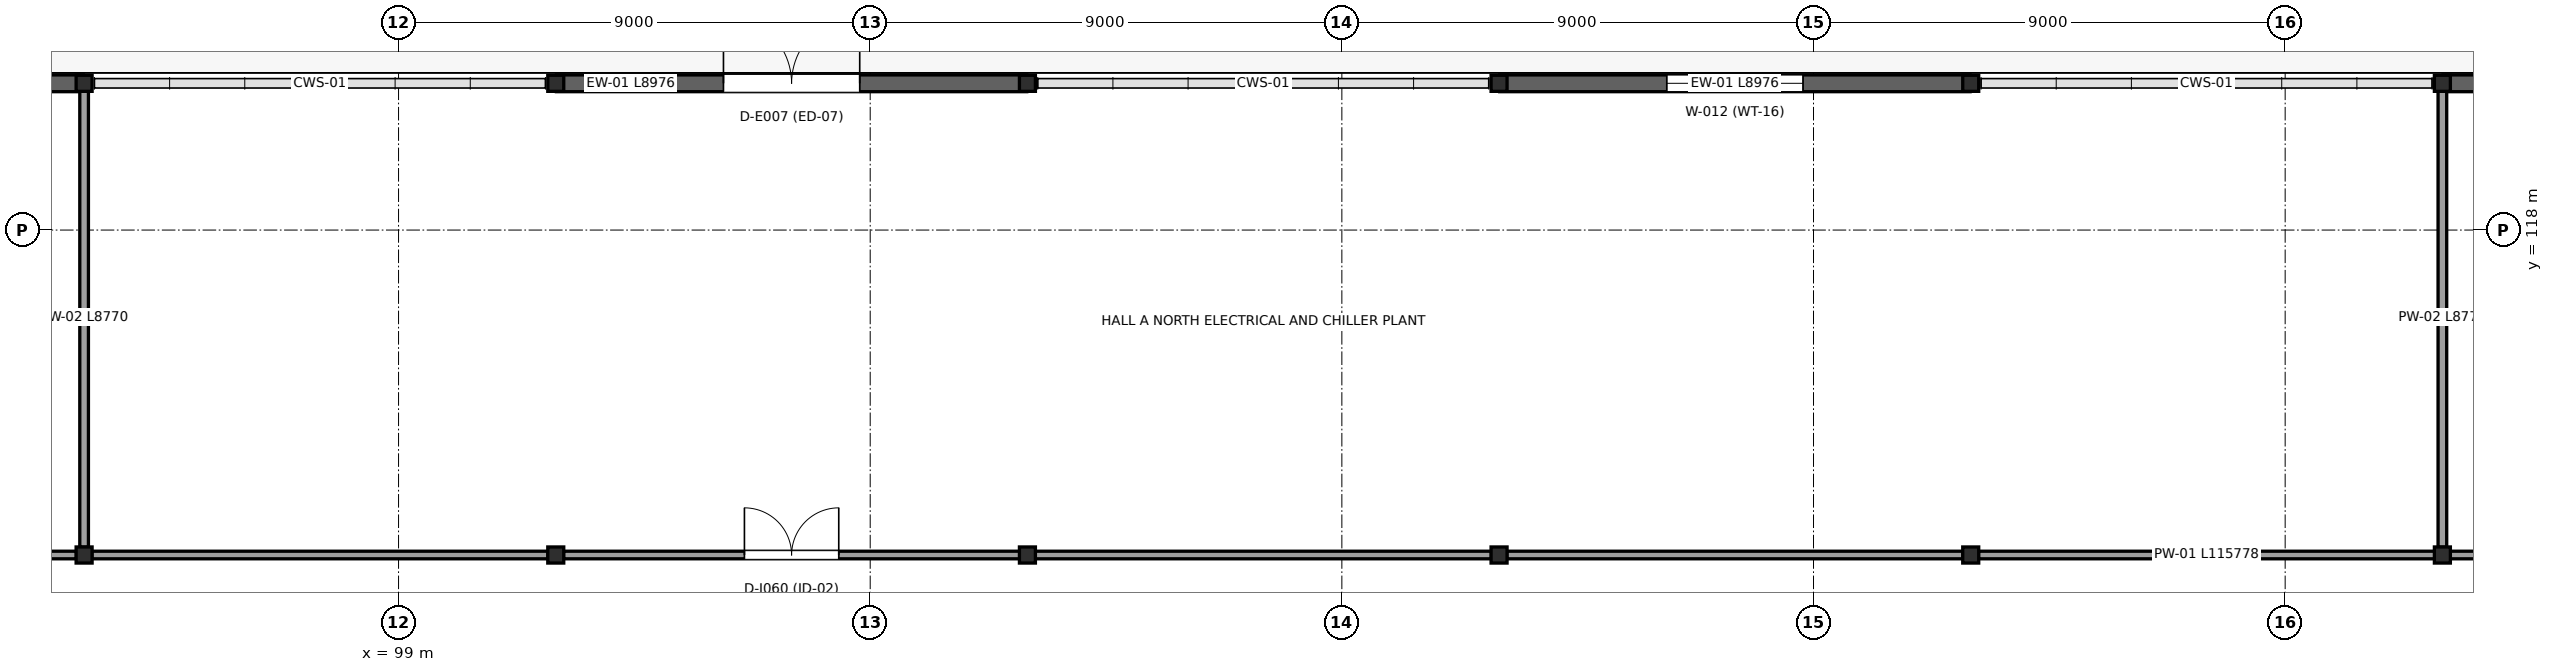
"""IFC4 building model, lengths in metres.
Left out: names, types, materials, properties, quantities, classifications, styles, units other than length and angle.
Written with IfcOpenShell. Run it as: python <this file> out.ifc"""

import sys

from ifc_helpers import new_model, si_unit, direction, frame, frame_2d, origin, origin_2d, place, context, subcontext, project, spatial, rectangle, i_section, extrude, element, fill, save


model = new_model("IFC4")
c1 = context("Model", 3, precision=1e-05, world=origin(), true_north=direction((0.0, 1.0)))
c2 = subcontext(c1, "Body", "Model", "MODEL_VIEW")
j1 = project(units=[si_unit("LENGTHUNIT", "METRE"), si_unit("PLANEANGLEUNIT", "RADIAN")], contexts=[c1])
p1 = place(None, origin())
s1 = spatial("IfcSite", under=j1, at=p1, CompositionType="ELEMENT")
p2 = place(p1, origin())
s2 = spatial("IfcBuilding", under=s1, at=p2, CompositionType="ELEMENT")
p3 = place(p2, origin())
s3 = spatial("IfcBuildingStorey", under=s2, at=p3, CompositionType="ELEMENT", Elevation=0.0)
for number, where, z_axis, x_axis in (
    (1, (93.0, 111.8, 0.0), (0.0, 0.0, 1.0), (1.0, 0.0, 0.0)),
    (2, (93.0, 120.8, 0.0), (0.0, 0.0, 1.0), (1.0, 0.0, 0.0)),
    (3, (102.0, 111.8, 0.0), (0.0, 0.0, 1.0), (1.0, 0.0, 0.0)),
    (4, (102.0, 120.8, 0.0), (0.0, 0.0, 1.0), (1.0, 0.0, 0.0)),
    (5, (111.0, 111.8, 0.0), (0.0, 0.0, 1.0), (1.0, 0.0, 0.0)),
    (6, (111.0, 120.8, 0.0), (0.0, 0.0, 1.0), (1.0, 0.0, 0.0)),
    (7, (120.0, 111.8, 0.0), (0.0, 0.0, 1.0), (1.0, 0.0, 0.0)),
    (8, (120.0, 120.8, 0.0), (0.0, 0.0, 1.0), (1.0, 0.0, 0.0)),
    (9, (129.0, 111.8, 0.0), (0.0, 0.0, 1.0), (1.0, 0.0, 0.0)),
    (10, (129.0, 120.8, 0.0), (0.0, 0.0, 1.0), (1.0, 0.0, 0.0)),
    (11, (138.0, 111.8, 0.0), (0.0, 0.0, 1.0), (1.0, 0.0, 0.0)),
    (12, (138.0, 120.8, 0.0), (0.0, 0.0, 1.0), (1.0, 0.0, 0.0)),
):
    element("IfcColumn", number, at=place(p3, frame(where, z_axis=z_axis, x_axis=x_axis)), inside=s3, PredefinedType="COLUMN", context=c2, shape_type="SweptSolid", body=[
        extrude(i_section(OverallWidth=0.305, OverallDepth=0.307, WebThickness=0.01, FlangeThickness=0.015, at=origin_2d()), origin(), (0.0, 0.0, 1.0), 6.0),
    ])
p4 = place(p3, frame((84.012, 120.8, 0.0), z_axis=(0.0, 0.0, 1.0), x_axis=(1.0, 0.0, 0.0)))
e13 = element("IfcWall", 13, at=p4, inside=s3, PredefinedType="STANDARD", context=c2, shape_type="SweptSolid", body=[
    extrude(rectangle(XDim=8.976, YDim=0.32, at=frame_2d((4.488, 0.0))), origin(), (0.0, 0.0, 1.0), 5.78),
])
p5 = place(p4, frame((2.913, 0.0, 1.1)))
e14 = element("IfcOpeningElement", 14, at=p5, cuts=e13, PredefinedType="OPENING", context=c2, shape_type="SweptSolid", body=[
    extrude(rectangle(XDim=3.15, YDim=2.4, at=frame_2d((1.575, 1.2))), frame((0.0, 0.17, 0.0), z_axis=(0.0, -1.0, 0.0), x_axis=(1.0, 0.0, 0.0)), (0.0, 0.0, 1.0), 0.34),
])
p6 = place(p3, frame((102.012, 120.8, 0.0), z_axis=(0.0, 0.0, 1.0), x_axis=(1.0, 0.0, 0.0)))
e15 = element("IfcWall", 15, at=p6, inside=s3, PredefinedType="STANDARD", context=c2, shape_type="SweptSolid", body=[
    extrude(rectangle(XDim=8.976, YDim=0.32, at=frame_2d((4.488, 0.0))), origin(), (0.0, 0.0, 1.0), 5.78),
])
p7 = place(p6, frame((3.188, 0.0, 0.0)))
e16 = element("IfcOpeningElement", 16, at=p7, cuts=e15, PredefinedType="OPENING", context=c2, shape_type="SweptSolid", body=[
    extrude(rectangle(XDim=2.6, YDim=2.65, at=frame_2d((1.3, 1.325))), frame((0.0, 0.17, 0.0), z_axis=(0.0, -1.0, 0.0), x_axis=(1.0, 0.0, 0.0)), (0.0, 0.0, 1.0), 0.34),
])
p8 = place(p3, frame((120.012, 120.8, 0.0), z_axis=(0.0, 0.0, 1.0), x_axis=(1.0, 0.0, 0.0)))
e17 = element("IfcWall", 17, at=p8, inside=s3, PredefinedType="STANDARD", context=c2, shape_type="SweptSolid", body=[
    extrude(rectangle(XDim=8.976, YDim=0.32, at=frame_2d((4.488, 0.0))), origin(), (0.0, 0.0, 1.0), 5.78),
])
p9 = place(p8, frame((3.188, 0.0, 1.1)))
e18 = element("IfcOpeningElement", 18, at=p9, cuts=e17, PredefinedType="OPENING", context=c2, shape_type="SweptSolid", body=[
    extrude(rectangle(XDim=2.6, YDim=2.15, at=frame_2d((1.3, 1.075))), frame((0.0, 0.17, 0.0), z_axis=(0.0, -1.0, 0.0), x_axis=(1.0, 0.0, 0.0)), (0.0, 0.0, 1.0), 0.34),
])
p10 = place(p3, frame((138.012, 120.8, 0.0), z_axis=(0.0, 0.0, 1.0), x_axis=(1.0, 0.0, 0.0)))
e19 = element("IfcWall", 19, at=p10, inside=s3, PredefinedType="STANDARD", context=c2, shape_type="SweptSolid", body=[
    extrude(rectangle(XDim=8.976, YDim=0.32, at=frame_2d((4.488, 0.0))), origin(), (0.0, 0.0, 1.0), 5.78),
])
p11 = place(p10, frame((3.288, 0.0, 0.0)))
e20 = element("IfcOpeningElement", 20, at=p11, cuts=e19, PredefinedType="OPENING", context=c2, shape_type="SweptSolid", body=[
    extrude(rectangle(XDim=2.4, YDim=2.6, at=frame_2d((1.2, 1.3))), frame((0.0, 0.17, 0.0), z_axis=(0.0, -1.0, 0.0), x_axis=(1.0, 0.0, 0.0)), (0.0, 0.0, 1.0), 0.34),
])
for number, where, z_axis, x_axis in (
    (21, (84.147, 111.8, 0.0), (0.0, 0.0, 1.0), (1.0, 0.0, 0.0)),
    (22, (93.147, 111.8, 0.0), (0.0, 0.0, 1.0), (1.0, 0.0, 0.0)),
):
    element("IfcWall", number, at=place(p3, frame(where, z_axis=z_axis, x_axis=x_axis)), inside=s3, PredefinedType="PARTITIONING", context=c2, shape_type="SweptSolid", body=[
        extrude(rectangle(XDim=8.706, YDim=0.145, at=frame_2d((4.353, 0.0))), origin(), (0.0, 0.0, 1.0), 5.2),
    ])
p12 = place(p3, frame((102.147, 111.8, 0.0), z_axis=(0.0, 0.0, 1.0), x_axis=(1.0, 0.0, 0.0)))
e23 = element("IfcWall", 23, at=p12, inside=s3, PredefinedType="PARTITIONING", context=c2, shape_type="SweptSolid", body=[
    extrude(rectangle(XDim=8.706, YDim=0.145, at=frame_2d((4.353, 0.0))), origin(), (0.0, 0.0, 1.0), 5.2),
])
p13 = place(p12, frame((3.453, 0.0, 0.0)))
e24 = element("IfcOpeningElement", 24, at=p13, cuts=e23, PredefinedType="OPENING", context=c2, shape_type="SweptSolid", body=[
    extrude(rectangle(XDim=1.8, YDim=2.3, at=frame_2d((0.9, 1.15))), frame((0.0, 0.083, 0.0), z_axis=(0.0, -1.0, 0.0), x_axis=(1.0, 0.0, 0.0)), (0.0, 0.0, 1.0), 0.165),
])
for number, where, z_axis, x_axis in (
    (25, (111.147, 111.8, 0.0), (0.0, 0.0, 1.0), (1.0, 0.0, 0.0)),
    (26, (120.147, 111.8, 0.0), (0.0, 0.0, 1.0), (1.0, 0.0, 0.0)),
    (27, (129.147, 111.8, 0.0), (0.0, 0.0, 1.0), (1.0, 0.0, 0.0)),
):
    element("IfcWall", number, at=place(p3, frame(where, z_axis=z_axis, x_axis=x_axis)), inside=s3, PredefinedType="PARTITIONING", context=c2, shape_type="SweptSolid", body=[
        extrude(rectangle(XDim=8.706, YDim=0.145, at=frame_2d((4.353, 0.0))), origin(), (0.0, 0.0, 1.0), 5.2),
    ])
p14 = place(p3, frame((138.147, 111.8, 0.0), z_axis=(0.0, 0.0, 1.0), x_axis=(1.0, 0.0, 0.0)))
e28 = element("IfcWall", 28, at=p14, inside=s3, PredefinedType="PARTITIONING", context=c2, shape_type="SweptSolid", body=[
    extrude(rectangle(XDim=8.706, YDim=0.145, at=frame_2d((4.353, 0.0))), origin(), (0.0, 0.0, 1.0), 5.2),
])
p15 = place(p14, frame((3.863, 0.0, 0.0)))
e29 = element("IfcOpeningElement", 29, at=p15, cuts=e28, PredefinedType="OPENING", context=c2, shape_type="SweptSolid", body=[
    extrude(rectangle(XDim=0.98, YDim=2.15, at=frame_2d((0.49, 1.075))), frame((0.0, 0.083, 0.0), z_axis=(0.0, -1.0, 0.0), x_axis=(1.0, 0.0, 0.0)), (0.0, 0.0, 1.0), 0.165),
])
p16 = place(p14, frame((1.2, 0.0, 0.0)))
e30 = element("IfcOpeningElement", 30, at=p16, cuts=e28, PredefinedType="OPENING", context=c2, shape_type="SweptSolid", body=[
    extrude(rectangle(XDim=1.05, YDim=2.18, at=frame_2d((0.525, 1.09))), frame((0.0, 0.083, 0.0), z_axis=(0.0, -1.0, 0.0), x_axis=(1.0, 0.0, 0.0)), (0.0, 0.0, 1.0), 0.165),
])
for number, where, z_axis, x_axis in (
    (31, (93.0, 111.95, 0.0), (0.0, 0.0, 1.0), (0.0, 1.0, 0.0)),
    (32, (138.0, 111.95, 0.0), (0.0, 0.0, 1.0), (0.0, 1.0, 0.0)),
):
    element("IfcWall", number, at=place(p3, frame(where, z_axis=z_axis, x_axis=x_axis)), inside=s3, PredefinedType="PARTITIONING", context=c2, shape_type="SweptSolid", body=[
        extrude(rectangle(XDim=8.77, YDim=0.165, at=frame_2d((4.385, 0.0))), origin(), (0.0, 0.0, 1.0), 5.2),
    ])
p17 = place(p7, origin())
e33 = element("IfcDoor", 33, at=p17, inside=s3, OperationType="DOUBLE_DOOR_SINGLE_SWING", PredefinedType="DOOR", context=c2, shape_type="SweptSolid", body=[
    extrude(rectangle(XDim=2.6, YDim=2.65, at=frame_2d((1.3, 1.325))), frame((0.0, 0.025, 0.0), z_axis=(0.0, -1.0, 0.0), x_axis=(1.0, 0.0, 0.0)), (0.0, 0.0, 1.0), 0.05),
])
fill(e16, e33)
p18 = place(p9, origin())
e34 = element("IfcWindow", 34, at=p18, inside=s3, PartitioningType="SINGLE_PANEL", PredefinedType="WINDOW", context=c2, shape_type="SweptSolid", body=[
    extrude(rectangle(XDim=2.6, YDim=2.15, at=frame_2d((1.3, 1.075))), frame((0.0, 0.03, 0.0), z_axis=(0.0, -1.0, 0.0), x_axis=(1.0, 0.0, 0.0)), (0.0, 0.0, 1.0), 0.06),
])
fill(e18, e34)
p19 = place(p13, origin())
e35 = element("IfcDoor", 35, at=p19, inside=s3, OperationType="DOUBLE_DOOR_SINGLE_SWING", PredefinedType="DOOR", context=c2, shape_type="SweptSolid", body=[
    extrude(rectangle(XDim=1.8, YDim=2.3, at=frame_2d((0.9, 1.15))), frame((0.0, 0.025, 0.0), z_axis=(0.0, -1.0, 0.0), x_axis=(1.0, 0.0, 0.0)), (0.0, 0.0, 1.0), 0.05),
])
fill(e24, e35)
save(model, sys.argv[1])
